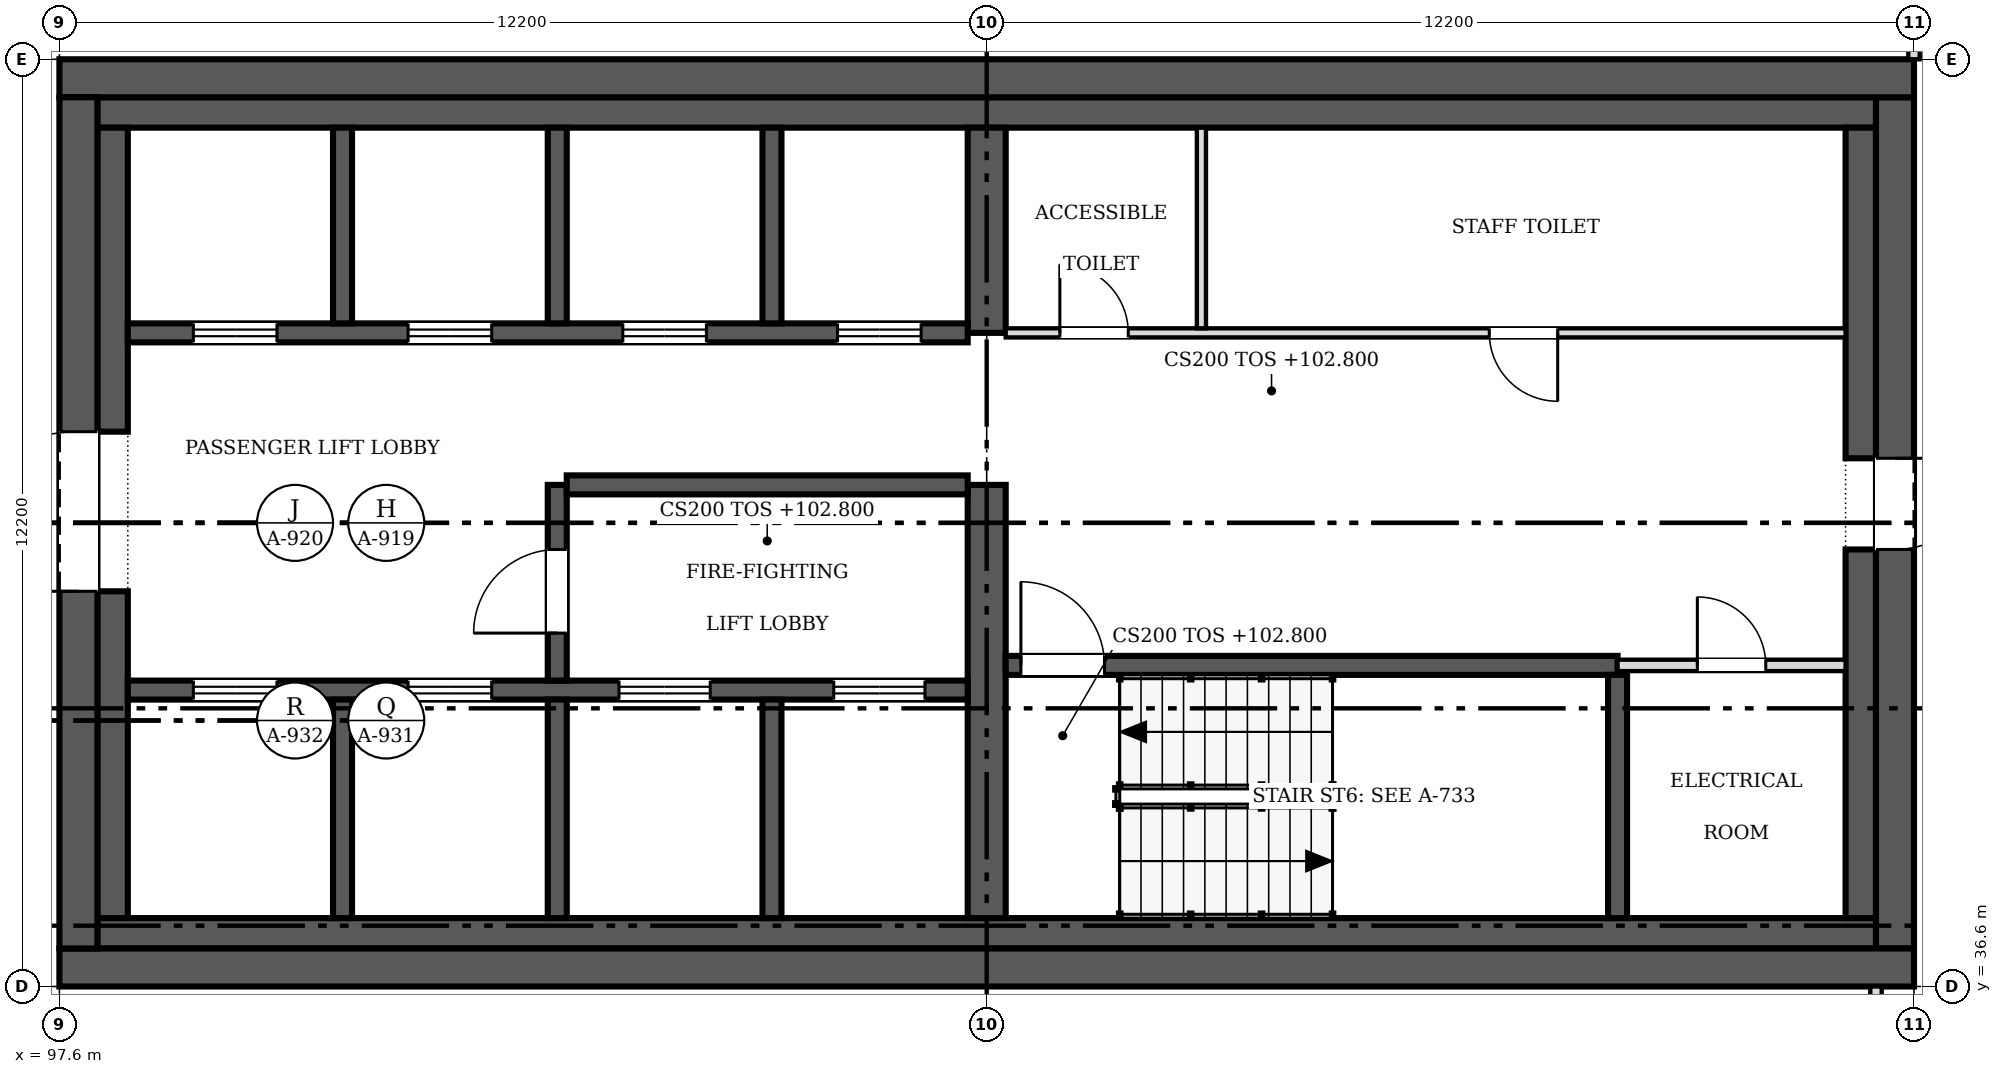
"""IFC4 building model, lengths in metres.
Left out: names, types, materials, properties, quantities, classifications, styles, units other than length and angle.
Written with IfcOpenShell. Run it as: python <this file> out.ifc"""

import sys

from ifc_helpers import new_model, si_unit, direction, frame, frame_2d, origin, place, context, subcontext, project, spatial, rectangle, extrude, source, transform, mapped, element, fill, save


model = new_model("IFC4")
c1 = context("Model", 3, precision=1e-05, world=origin(), true_north=direction((0.0, 1.0)))
c2 = subcontext(c1, "Body", "Model", "MODEL_VIEW")
j1 = project(units=[si_unit("LENGTHUNIT", "METRE"), si_unit("PLANEANGLEUNIT", "RADIAN")], contexts=[c1])
p1 = place(None, origin())
s1 = spatial("IfcSite", under=j1, at=p1, CompositionType="ELEMENT")
p2 = place(p1, origin())
s2 = spatial("IfcBuilding", under=s1, at=p2, CompositionType="ELEMENT")
p3 = place(p2, frame((0.0, 0.0, 102.8)))
s3 = spatial("IfcBuildingStorey", under=s2, at=p3, CompositionType="ELEMENT", Elevation=102.8)
p4 = place(p3, frame((122.0, 36.85, 0.0), z_axis=(0.0, 0.0, 1.0), x_axis=(-1.0, 0.0, 0.0)))
e1 = element("IfcWall", 1, at=p4, inside=s3, PredefinedType="SHEAR", context=c2, shape_type="SweptSolid", body=[
    extrude(rectangle(XDim=24.4, YDim=0.5, at=frame_2d((12.2, 0.0))), origin(), (0.0, 0.0, 1.0), 3.8),
])
p5 = place(p3, frame((97.85, 37.1, 0.0), z_axis=(0.0, 0.0, 1.0), x_axis=(0.0, 1.0, 0.0)))
e2 = element("IfcWall", 2, at=p5, inside=s3, PredefinedType="SHEAR", context=c2, shape_type="SweptSolid", body=[
    extrude(rectangle(XDim=11.2, YDim=0.5, at=frame_2d((5.6, 0.0))), origin(), (0.0, 0.0, 1.0), 3.8),
])
m1 = source(origin(), c2, "Body", "SweptSolid", [
    extrude(rectangle(XDim=2.1, YDim=2.4, at=frame_2d((1.05, 1.2))), frame((0.0, 0.26, 0.0), z_axis=(0.0, -1.0, 0.0), x_axis=(1.0, 0.0, 0.0)), (0.0, 0.0, 1.0), 0.52),
])
p6 = place(p5, frame((4.7, 0.0, 0.0)))
e3 = element("IfcOpeningElement", 3, at=p6, cuts=e2, PredefinedType="OPENING", context=c2, shape_type="MappedRepresentation", body=[
    mapped(m1, transform((0.0, 0.0, 0.0), scale=1.0)),
])
p7 = place(p3, frame((97.6, 48.55, 0.0), z_axis=(0.0, 0.0, 1.0), x_axis=(1.0, 0.0, 0.0)))
e4 = element("IfcWall", 4, at=p7, inside=s3, PredefinedType="SHEAR", context=c2, shape_type="SweptSolid", body=[
    extrude(rectangle(XDim=24.4, YDim=0.5, at=frame_2d((12.2, 0.0))), origin(), (0.0, 0.0, 1.0), 3.8),
])
p8 = place(p3, frame((121.75, 48.3, 0.0), z_axis=(0.0, 0.0, 1.0), x_axis=(0.0, -1.0, 0.0)))
e5 = element("IfcWall", 5, at=p8, inside=s3, PredefinedType="SHEAR", context=c2, shape_type="SweptSolid", body=[
    extrude(rectangle(XDim=11.2, YDim=0.5, at=frame_2d((5.6, 0.0))), origin(), (0.0, 0.0, 1.0), 3.8),
])
m2 = source(origin(), c2, "Body", "SweptSolid", [
    extrude(rectangle(XDim=1.2, YDim=2.1, at=frame_2d((0.6, 1.05))), frame((0.0, 0.26, 0.0), z_axis=(0.0, -1.0, 0.0), x_axis=(1.0, 0.0, 0.0)), (0.0, 0.0, 1.0), 0.52),
])
p9 = place(p8, frame((4.75, 0.0, 0.0)))
e6 = element("IfcOpeningElement", 6, at=p9, cuts=e5, PredefinedType="OPENING", context=c2, shape_type="MappedRepresentation", body=[
    mapped(m2, transform((0.0, 0.0, 0.0), scale=1.0)),
])
for number, where, z_axis, x_axis in (
    (7, (98.1, 37.3, 0.0), (0.0, 0.0, 1.0), (1.0, 0.0, 0.0)),
    (8, (98.1, 48.1, 0.0), (0.0, 0.0, 1.0), (1.0, 0.0, 0.0)),
):
    element("IfcWall", number, at=place(p3, frame(where, z_axis=z_axis, x_axis=x_axis)), inside=s3, PredefinedType="SOLIDWALL", context=c2, shape_type="SweptSolid", body=[
        extrude(rectangle(XDim=23.4, YDim=0.4, at=frame_2d((11.7, 0.0))), origin(), (0.0, 0.0, 1.0), 3.8),
    ])
p10 = place(p3, frame((98.3, 37.5, 0.0), z_axis=(0.0, 0.0, 1.0), x_axis=(0.0, 1.0, 0.0)))
e9 = element("IfcWall", 9, at=p10, inside=s3, PredefinedType="SOLIDWALL", context=c2, shape_type="SweptSolid", body=[
    extrude(rectangle(XDim=4.3, YDim=0.4, at=frame_2d((2.15, 0.0))), origin(), (0.0, 0.0, 1.0), 3.8),
])
p11 = place(p3, frame((98.3, 43.9, 0.0), z_axis=(0.0, 0.0, 1.0), x_axis=(0.0, 1.0, 0.0)))
e10 = element("IfcWall", 10, at=p11, inside=s3, PredefinedType="SOLIDWALL", context=c2, shape_type="SweptSolid", body=[
    extrude(rectangle(XDim=4.0, YDim=0.4, at=frame_2d((2.0, 0.0))), origin(), (0.0, 0.0, 1.0), 3.8),
])
p12 = place(p3, frame((121.3, 37.5, 0.0), z_axis=(0.0, 0.0, 1.0), x_axis=(0.0, 1.0, 0.0)))
e11 = element("IfcWall", 11, at=p12, inside=s3, PredefinedType="SOLIDWALL", context=c2, shape_type="SweptSolid", body=[
    extrude(rectangle(XDim=4.85, YDim=0.4, at=frame_2d((2.425, 0.0))), origin(), (0.0, 0.0, 1.0), 3.8),
])
p13 = place(p3, frame((121.3, 43.55, 0.0), z_axis=(0.0, 0.0, 1.0), x_axis=(0.0, 1.0, 0.0)))
e12 = element("IfcWall", 12, at=p13, inside=s3, PredefinedType="SOLIDWALL", context=c2, shape_type="SweptSolid", body=[
    extrude(rectangle(XDim=4.35, YDim=0.4, at=frame_2d((2.175, 0.0))), origin(), (0.0, 0.0, 1.0), 3.8),
])
p14 = place(p3, frame((109.8, 37.5, 0.0), z_axis=(0.0, 0.0, 1.0), x_axis=(0.0, 1.0, 0.0)))
e13 = element("IfcWall", 13, at=p14, inside=s3, PredefinedType="SHEAR", context=c2, shape_type="SweptSolid", body=[
    extrude(rectangle(XDim=5.7, YDim=0.5, at=frame_2d((2.85, 0.0))), origin(), (0.0, 0.0, 1.0), 3.8),
])
p15 = place(p3, frame((109.8, 45.2, 0.0), z_axis=(0.0, 0.0, 1.0), x_axis=(0.0, 1.0, 0.0)))
e14 = element("IfcWall", 14, at=p15, inside=s3, PredefinedType="SHEAR", context=c2, shape_type="SweptSolid", body=[
    extrude(rectangle(XDim=2.7, YDim=0.5, at=frame_2d((1.35, 0.0))), origin(), (0.0, 0.0, 1.0), 3.8),
])
p16 = place(p3, frame((98.5, 40.5, 0.0), z_axis=(0.0, 0.0, 1.0), x_axis=(1.0, 0.0, 0.0)))
e15 = element("IfcWall", 15, at=p16, inside=s3, PredefinedType="SOLIDWALL", context=c2, shape_type="SweptSolid", body=[
    extrude(rectangle(XDim=11.05, YDim=0.25, at=frame_2d((5.525, 0.0))), origin(), (0.0, 0.0, 1.0), 3.8),
])
m3 = source(origin(), c2, "Body", "SweptSolid", [
    extrude(rectangle(XDim=1.1, YDim=2.1, at=frame_2d((0.55, 1.05))), frame((0.0, 0.135, 0.0), z_axis=(0.0, -1.0, 0.0), x_axis=(1.0, 0.0, 0.0)), (0.0, 0.0, 1.0), 0.27),
])
p17 = place(p16, frame((0.863, 0.0, 0.0)))
e16 = element("IfcOpeningElement", 16, at=p17, cuts=e15, PredefinedType="OPENING", context=c2, shape_type="MappedRepresentation", body=[
    mapped(m3, transform((0.0, 0.0, 0.0), scale=1.0)),
])
p18 = place(p16, frame((3.688, 0.0, 0.0)))
e17 = element("IfcOpeningElement", 17, at=p18, cuts=e15, PredefinedType="OPENING", context=c2, shape_type="MappedRepresentation", body=[
    mapped(m3, transform((0.0, 0.0, 0.0), scale=1.0)),
])
m4 = source(origin(), c2, "Body", "SweptSolid", [
    extrude(rectangle(XDim=1.2, YDim=2.1, at=frame_2d((0.6, 1.05))), frame((0.0, 0.135, 0.0), z_axis=(0.0, -1.0, 0.0), x_axis=(1.0, 0.0, 0.0)), (0.0, 0.0, 1.0), 0.27),
])
p19 = place(p16, frame((6.462, 0.0, 0.0)))
e18 = element("IfcOpeningElement", 18, at=p19, cuts=e15, PredefinedType="OPENING", context=c2, shape_type="MappedRepresentation", body=[
    mapped(m4, transform((0.0, 0.0, 0.0), scale=1.0)),
])
p20 = place(p16, frame((9.288, 0.0, 0.0)))
e19 = element("IfcOpeningElement", 19, at=p20, cuts=e15, PredefinedType="OPENING", context=c2, shape_type="MappedRepresentation", body=[
    mapped(m4, transform((0.0, 0.0, 0.0), scale=1.0)),
])
p21 = place(p3, frame((109.55, 45.2, 0.0), z_axis=(0.0, 0.0, 1.0), x_axis=(-1.0, 0.0, 0.0)))
e20 = element("IfcWall", 20, at=p21, inside=s3, PredefinedType="SOLIDWALL", context=c2, shape_type="SweptSolid", body=[
    extrude(rectangle(XDim=11.05, YDim=0.25, at=frame_2d((5.525, 0.0))), origin(), (0.0, 0.0, 1.0), 3.8),
])
p22 = place(p21, frame((9.087, 0.0, 0.0)))
e21 = element("IfcOpeningElement", 21, at=p22, cuts=e20, PredefinedType="OPENING", context=c2, shape_type="MappedRepresentation", body=[
    mapped(m3, transform((0.0, 0.0, 0.0), scale=1.0)),
])
p23 = place(p21, frame((6.262, 0.0, 0.0)))
e22 = element("IfcOpeningElement", 22, at=p23, cuts=e20, PredefinedType="OPENING", context=c2, shape_type="MappedRepresentation", body=[
    mapped(m3, transform((0.0, 0.0, 0.0), scale=1.0)),
])
p24 = place(p21, frame((3.438, 0.0, 0.0)))
e23 = element("IfcOpeningElement", 23, at=p24, cuts=e20, PredefinedType="OPENING", context=c2, shape_type="MappedRepresentation", body=[
    mapped(m3, transform((0.0, 0.0, 0.0), scale=1.0)),
])
p25 = place(p21, frame((0.613, 0.0, 0.0)))
e24 = element("IfcOpeningElement", 24, at=p25, cuts=e20, PredefinedType="OPENING", context=c2, shape_type="MappedRepresentation", body=[
    mapped(m3, transform((0.0, 0.0, 0.0), scale=1.0)),
])
p26 = place(p3, frame((118.1, 40.825, 0.0), z_axis=(0.0, 0.0, 1.0), x_axis=(-1.0, 0.0, 0.0)))
e25 = element("IfcWall", 25, at=p26, inside=s3, PredefinedType="SOLIDWALL", context=c2, shape_type="SweptSolid", body=[
    extrude(rectangle(XDim=8.05, YDim=0.25, at=frame_2d((4.025, 0.0))), origin(), (0.0, 0.0, 1.0), 3.8),
])
p27 = place(p26, frame((6.75, 0.0, 0.0)))
e26 = element("IfcOpeningElement", 26, at=p27, cuts=e25, PredefinedType="OPENING", context=c2, shape_type="MappedRepresentation", body=[
    mapped(m3, transform((0.0, 0.0, 0.0), scale=1.0)),
])
p28 = place(p3, frame((104.15, 37.5, 0.0), z_axis=(0.0, 0.0, 1.0), x_axis=(0.0, 1.0, 0.0)))
e27 = element("IfcWall", 27, at=p28, inside=s3, PredefinedType="SOLIDWALL", context=c2, shape_type="SweptSolid", body=[
    extrude(rectangle(XDim=2.875, YDim=0.25, at=frame_2d((1.438, 0.0))), origin(), (0.0, 0.0, 1.0), 3.8),
])
p29 = place(p3, frame((104.15, 43.2, 0.0), z_axis=(0.0, 0.0, 1.0), x_axis=(0.0, -1.0, 0.0)))
e28 = element("IfcWall", 28, at=p29, inside=s3, PredefinedType="SOLIDWALL", context=c2, shape_type="SweptSolid", body=[
    extrude(rectangle(XDim=2.575, YDim=0.25, at=frame_2d((1.288, 0.0))), origin(), (0.0, 0.0, 1.0), 3.8),
])
p30 = place(p29, frame((0.85, 0.0, 0.0)))
e29 = element("IfcOpeningElement", 29, at=p30, cuts=e28, PredefinedType="OPENING", context=c2, shape_type="MappedRepresentation", body=[
    mapped(m3, transform((0.0, 0.0, 0.0), scale=1.0)),
])
p31 = place(p3, frame((104.275, 43.2, 0.0), z_axis=(0.0, 0.0, 1.0), x_axis=(1.0, 0.0, 0.0)))
e30 = element("IfcWall", 30, at=p31, inside=s3, PredefinedType="SOLIDWALL", context=c2, shape_type="SweptSolid", body=[
    extrude(rectangle(XDim=5.275, YDim=0.25, at=frame_2d((2.638, 0.0))), origin(), (0.0, 0.0, 1.0), 3.8),
])
p32 = place(p3, frame((118.1, 37.5, 0.0), z_axis=(0.0, 0.0, 1.0), x_axis=(0.0, 1.0, 0.0)))
e31 = element("IfcWall", 31, at=p32, inside=s3, PredefinedType="SOLIDWALL", context=c2, shape_type="SweptSolid", body=[
    extrude(rectangle(XDim=3.2, YDim=0.25, at=frame_2d((1.6, 0.0))), origin(), (0.0, 0.0, 1.0), 3.8),
])
for number, where, z_axis, x_axis in (
    (32, (101.325, 37.5, 0.0), (0.0, 0.0, 1.0), (0.0, 1.0, 0.0)),
    (33, (106.975, 37.5, 0.0), (0.0, 0.0, 1.0), (0.0, 1.0, 0.0)),
):
    element("IfcWall", number, at=place(p3, frame(where, z_axis=z_axis, x_axis=x_axis)), inside=s3, PredefinedType="SOLIDWALL", context=c2, shape_type="SweptSolid", body=[
        extrude(rectangle(XDim=2.875, YDim=0.25, at=frame_2d((1.438, 0.0))), origin(), (0.0, 0.0, 1.0), 3.8),
    ])
for number, where, z_axis, x_axis in (
    (34, (101.325, 45.325, 0.0), (0.0, 0.0, 1.0), (0.0, 1.0, 0.0)),
    (35, (104.15, 45.325, 0.0), (0.0, 0.0, 1.0), (0.0, 1.0, 0.0)),
    (36, (106.975, 45.325, 0.0), (0.0, 0.0, 1.0), (0.0, 1.0, 0.0)),
):
    element("IfcWall", number, at=place(p3, frame(where, z_axis=z_axis, x_axis=x_axis)), inside=s3, PredefinedType="SOLIDWALL", context=c2, shape_type="SweptSolid", body=[
        extrude(rectangle(XDim=2.575, YDim=0.25, at=frame_2d((1.288, 0.0))), origin(), (0.0, 0.0, 1.0), 3.8),
    ])
p33 = place(p3, frame((110.05, 45.2, 0.0), z_axis=(0.0, 0.0, 1.0), x_axis=(1.0, 0.0, 0.0)))
e37 = element("IfcWall", 37, at=p33, inside=s3, PredefinedType="PARTITIONING", context=c2, shape_type="SweptSolid", body=[
    extrude(rectangle(XDim=11.05, YDim=0.12, at=frame_2d((5.525, 0.0))), origin(), (0.0, 0.0, 1.0), 3.55),
])
m5 = source(origin(), c2, "Body", "SweptSolid", [
    extrude(rectangle(XDim=0.9, YDim=2.1, at=frame_2d((0.45, 1.05))), frame((0.0, 0.07, 0.0), z_axis=(0.0, -1.0, 0.0), x_axis=(1.0, 0.0, 0.0)), (0.0, 0.0, 1.0), 0.14),
])
p34 = place(p33, frame((0.712, 0.0, 0.0)))
e38 = element("IfcOpeningElement", 38, at=p34, cuts=e37, PredefinedType="OPENING", context=c2, shape_type="MappedRepresentation", body=[
    mapped(m5, transform((0.0, 0.0, 0.0), scale=1.0)),
])
p35 = place(p33, frame((6.363, 0.0, 0.0)))
e39 = element("IfcOpeningElement", 39, at=p35, cuts=e37, PredefinedType="OPENING", context=c2, shape_type="MappedRepresentation", body=[
    mapped(m5, transform((0.0, 0.0, 0.0), scale=1.0)),
])
p36 = place(p3, frame((121.1, 40.825, 0.0), z_axis=(0.0, 0.0, 1.0), x_axis=(-1.0, 0.0, 0.0)))
e40 = element("IfcWall", 40, at=p36, inside=s3, PredefinedType="PARTITIONING", context=c2, shape_type="SweptSolid", body=[
    extrude(rectangle(XDim=3.0, YDim=0.15, at=frame_2d((1.5, 0.0))), origin(), (0.0, 0.0, 1.0), 3.55),
])
m6 = source(origin(), c2, "Body", "SweptSolid", [
    extrude(rectangle(XDim=0.9, YDim=2.1, at=frame_2d((0.45, 1.05))), frame((0.0, 0.085, 0.0), z_axis=(0.0, -1.0, 0.0), x_axis=(1.0, 0.0, 0.0)), (0.0, 0.0, 1.0), 0.17),
])
p37 = place(p36, frame((1.05, 0.0, 0.0)))
e41 = element("IfcOpeningElement", 41, at=p37, cuts=e40, PredefinedType="OPENING", context=c2, shape_type="MappedRepresentation", body=[
    mapped(m6, transform((0.0, 0.0, 0.0), scale=1.0)),
])
p38 = place(p3, frame((112.625, 45.26, 0.0), z_axis=(0.0, 0.0, 1.0), x_axis=(0.0, 1.0, 0.0)))
e42 = element("IfcWall", 42, at=p38, inside=s3, PredefinedType="PARTITIONING", context=c2, shape_type="SweptSolid", body=[
    extrude(rectangle(XDim=2.64, YDim=0.12, at=frame_2d((1.32, 0.0))), origin(), (0.0, 0.0, 1.0), 3.55),
])
p39 = place(p3, frame((121.5, 36.6, 0.0), z_axis=(0.0, 0.0, 1.0), x_axis=(0.0, -1.0, 0.0)))
e43 = element("IfcWall", 43, at=p39, inside=s3, PredefinedType="PARTITIONING", context=c2, shape_type="SweptSolid", body=[
    extrude(rectangle(XDim=2.524, YDim=0.15, at=frame_2d((1.262, 0.0))), origin(), (0.0, 0.0, 1.0), 2.715),
])
m7 = source(origin(), c2, "Body", "SweptSolid", [
    extrude(rectangle(XDim=1.0, YDim=2.1, at=frame_2d((0.5, 1.05))), frame((0.0, 0.085, 0.0), z_axis=(0.0, -1.0, 0.0), x_axis=(1.0, 0.0, 0.0)), (0.0, 0.0, 1.0), 0.17),
])
p40 = place(p39, frame((0.724, 0.0, 0.0)))
e44 = element("IfcOpeningElement", 44, at=p40, cuts=e43, PredefinedType="OPENING", context=c2, shape_type="MappedRepresentation", body=[
    mapped(m7, transform((0.0, 0.0, 0.0), scale=1.0)),
])
p41 = place(p3, frame((122.0, 48.8, 0.0), z_axis=(0.0, 0.0, 1.0), x_axis=(0.0, 1.0, 0.0)))
e45 = element("IfcWall", 45, at=p41, inside=s3, PredefinedType="PARTITIONING", context=c2, shape_type="SweptSolid", body=[
    extrude(rectangle(XDim=2.324, YDim=0.15, at=frame_2d((1.162, 0.0))), origin(), (0.0, 0.0, 1.0), 2.715),
])
m8 = source(origin(), c2, "Body", "SweptSolid", [
    extrude(rectangle(XDim=2.1, YDim=2.4, at=frame_2d((1.05, 1.2))), frame((0.0, 0.025, 0.0), z_axis=(0.0, -1.0, 0.0), x_axis=(1.0, 0.0, 0.0)), (0.0, 0.0, 1.0), 0.05),
])
p42 = place(p6, origin())
e46 = element("IfcDoor", 46, at=p42, inside=s3, OperationType="DOUBLE_DOOR_SINGLE_SWING", PredefinedType="DOOR", context=c2, shape_type="MappedRepresentation", body=[
    mapped(m8, transform((0.0, 0.0, 0.0), scale=1.0)),
])
fill(e3, e46)
m9 = source(origin(), c2, "Body", "SweptSolid", [
    extrude(rectangle(XDim=1.2, YDim=2.1, at=frame_2d((0.6, 1.05))), frame((0.0, 0.025, 0.0), z_axis=(0.0, -1.0, 0.0), x_axis=(1.0, 0.0, 0.0)), (0.0, 0.0, 1.0), 0.05),
])
p43 = place(p9, origin())
e47 = element("IfcDoor", 47, at=p43, inside=s3, OperationType="SINGLE_SWING_LEFT", PredefinedType="DOOR", context=c2, shape_type="MappedRepresentation", body=[
    mapped(m9, transform((0.0, 0.0, 0.0), scale=1.0)),
])
fill(e6, e47)
m10 = source(origin(), c2, "Body", "SweptSolid", [
    extrude(rectangle(XDim=1.1, YDim=2.1, at=frame_2d((0.55, 1.05))), frame((0.0, 0.025, 0.0), z_axis=(0.0, -1.0, 0.0), x_axis=(1.0, 0.0, 0.0)), (0.0, 0.0, 1.0), 0.05),
])
p44 = place(p17, origin())
e48 = element("IfcDoor", 48, at=p44, inside=s3, OperationType="DOUBLE_DOOR_SLIDING", PredefinedType="DOOR", context=c2, shape_type="MappedRepresentation", body=[
    mapped(m10, transform((0.0, 0.0, 0.0), scale=1.0)),
])
fill(e16, e48)
p45 = place(p18, origin())
e49 = element("IfcDoor", 49, at=p45, inside=s3, OperationType="DOUBLE_DOOR_SLIDING", PredefinedType="DOOR", context=c2, shape_type="MappedRepresentation", body=[
    mapped(m10, transform((0.0, 0.0, 0.0), scale=1.0)),
])
fill(e17, e49)
p46 = place(p19, origin())
e50 = element("IfcDoor", 50, at=p46, inside=s3, OperationType="DOUBLE_DOOR_SLIDING", PredefinedType="DOOR", context=c2, shape_type="MappedRepresentation", body=[
    mapped(m9, transform((0.0, 0.0, 0.0), scale=1.0)),
])
fill(e18, e50)
p47 = place(p20, origin())
e51 = element("IfcDoor", 51, at=p47, inside=s3, OperationType="DOUBLE_DOOR_SLIDING", PredefinedType="DOOR", context=c2, shape_type="MappedRepresentation", body=[
    mapped(m9, transform((0.0, 0.0, 0.0), scale=1.0)),
])
fill(e19, e51)
p48 = place(p22, origin())
e52 = element("IfcDoor", 52, at=p48, inside=s3, OperationType="DOUBLE_DOOR_SLIDING", PredefinedType="DOOR", context=c2, shape_type="MappedRepresentation", body=[
    mapped(m10, transform((0.0, 0.0, 0.0), scale=1.0)),
])
fill(e21, e52)
p49 = place(p23, origin())
e53 = element("IfcDoor", 53, at=p49, inside=s3, OperationType="DOUBLE_DOOR_SLIDING", PredefinedType="DOOR", context=c2, shape_type="MappedRepresentation", body=[
    mapped(m10, transform((0.0, 0.0, 0.0), scale=1.0)),
])
fill(e22, e53)
p50 = place(p24, origin())
e54 = element("IfcDoor", 54, at=p50, inside=s3, OperationType="DOUBLE_DOOR_SLIDING", PredefinedType="DOOR", context=c2, shape_type="MappedRepresentation", body=[
    mapped(m10, transform((0.0, 0.0, 0.0), scale=1.0)),
])
fill(e23, e54)
p51 = place(p25, origin())
e55 = element("IfcDoor", 55, at=p51, inside=s3, OperationType="DOUBLE_DOOR_SLIDING", PredefinedType="DOOR", context=c2, shape_type="MappedRepresentation", body=[
    mapped(m10, transform((0.0, 0.0, 0.0), scale=1.0)),
])
fill(e24, e55)
p52 = place(p27, origin())
e56 = element("IfcDoor", 56, at=p52, inside=s3, OperationType="SINGLE_SWING_RIGHT", PredefinedType="DOOR", context=c2, shape_type="MappedRepresentation", body=[
    mapped(m10, transform((0.0, 0.0, 0.0), scale=1.0)),
])
fill(e26, e56)
p53 = place(p30, origin())
e57 = element("IfcDoor", 57, at=p53, inside=s3, OperationType="SINGLE_SWING_RIGHT", PredefinedType="DOOR", context=c2, shape_type="MappedRepresentation", body=[
    mapped(m10, transform((0.0, 0.0, 0.0), scale=1.0)),
])
fill(e29, e57)
m11 = source(origin(), c2, "Body", "SweptSolid", [
    extrude(rectangle(XDim=0.9, YDim=2.1, at=frame_2d((0.45, 1.05))), frame((0.0, 0.025, 0.0), z_axis=(0.0, -1.0, 0.0), x_axis=(1.0, 0.0, 0.0)), (0.0, 0.0, 1.0), 0.05),
])
p54 = place(p34, origin())
e58 = element("IfcDoor", 58, at=p54, inside=s3, OperationType="SINGLE_SWING_LEFT", PredefinedType="DOOR", context=c2, shape_type="MappedRepresentation", body=[
    mapped(m11, transform((0.0, 0.0, 0.0), scale=1.0)),
])
fill(e38, e58)
p55 = place(p35, origin())
e59 = element("IfcDoor", 59, at=p55, inside=s3, OperationType="SINGLE_SWING_RIGHT", PredefinedType="DOOR", context=c2, shape_type="MappedRepresentation", body=[
    mapped(m11, transform((0.0, 0.0, 0.0), scale=1.0)),
])
fill(e39, e59)
p56 = place(p37, origin())
e60 = element("IfcDoor", 60, at=p56, inside=s3, OperationType="SINGLE_SWING_RIGHT", PredefinedType="DOOR", context=c2, shape_type="MappedRepresentation", body=[
    mapped(m11, transform((0.0, 0.0, 0.0), scale=1.0)),
])
fill(e41, e60)
save(model, sys.argv[1])
